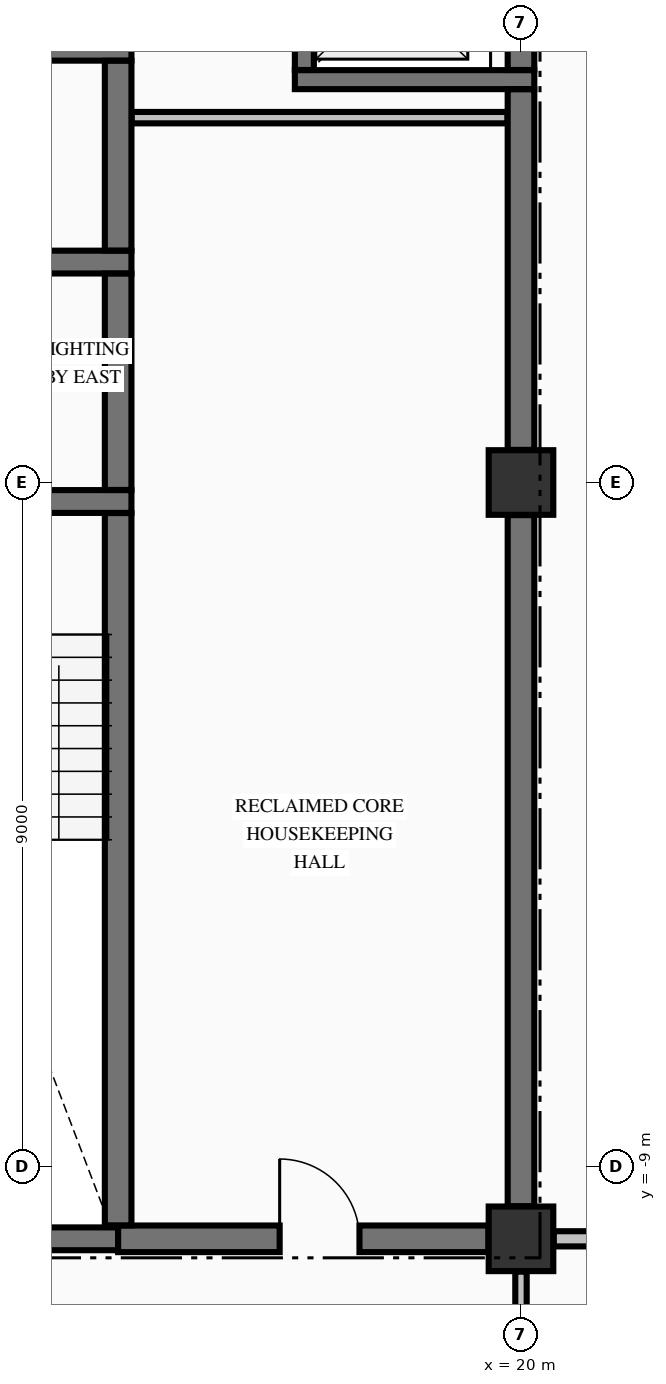
"""IFC4 building model, lengths in metres.
Left out: names, types, materials, properties, quantities, classifications, styles, units other than length and angle.
Written with IfcOpenShell. Run it as: python <this file> out.ifc"""

import sys

from ifc_helpers import new_model, si_unit, direction, frame, frame_2d, origin, origin_2d, place, context, subcontext, project, spatial, rectangle, extrude, element, fill, save


model = new_model("IFC4")
c1 = context("Model", 3, precision=1e-05, world=origin(), true_north=direction((0.0, 1.0)))
c2 = subcontext(c1, "Body", "Model", "MODEL_VIEW")
j1 = project(units=[si_unit("LENGTHUNIT", "METRE"), si_unit("PLANEANGLEUNIT", "RADIAN")], contexts=[c1])
p1 = place(None, origin())
s1 = spatial("IfcSite", under=j1, at=p1, CompositionType="ELEMENT")
p2 = place(p1, origin())
s2 = spatial("IfcBuilding", under=s1, at=p2, CompositionType="ELEMENT")
p3 = place(p2, frame((0.0, 0.0, 166.06)))
s3 = spatial("IfcBuildingStorey", under=s2, at=p3, CompositionType="ELEMENT", Elevation=166.06)
for number, where, z_axis, x_axis in (
    (1, (20.0, -9.95, -0.25), (0.0, 0.0, 1.0), (1.0, 0.0, 0.0)),
    (2, (20.0, 0.0, -0.25), (0.0, 0.0, 1.0), (1.0, 0.0, 0.0)),
):
    element("IfcColumn", number, at=place(p3, frame(where, z_axis=z_axis, x_axis=x_axis)), inside=s3, PredefinedType="COLUMN", context=c2, shape_type="SweptSolid", body=[
        extrude(rectangle(XDim=0.85, YDim=0.85, at=origin_2d()), origin(), (0.0, 0.0, 1.0), 3.4),
    ])
p4 = place(p3, frame((11.429, -9.95, 0.0), z_axis=(0.0, 0.0, 1.0), x_axis=(1.0, 0.0, 0.0)))
e3 = element("IfcWall", 3, at=p4, inside=s3, PredefinedType="SHEAR", context=c2, shape_type="SweptSolid", body=[
    extrude(rectangle(XDim=3.271, YDim=0.3, at=frame_2d((1.635, 0.0))), origin(), (0.0, 0.0, 1.0), 3.15),
])
p5 = place(p3, frame((14.7, -9.95, 0.0), z_axis=(0.0, 0.0, 1.0), x_axis=(1.0, 0.0, 0.0)))
e4 = element("IfcWall", 4, at=p5, inside=s3, PredefinedType="SHEAR", context=c2, shape_type="SweptSolid", body=[
    extrude(rectangle(XDim=4.871, YDim=0.35, at=frame_2d((2.436, 0.0))), origin(), (0.0, 0.0, 1.0), 3.15),
])
p6 = place(p5, frame((2.125, 0.0, 0.0)))
e5 = element("IfcOpeningElement", 5, at=p6, cuts=e4, PredefinedType="OPENING", context=c2, shape_type="SweptSolid", body=[
    extrude(rectangle(XDim=1.05, YDim=2.15, at=frame_2d((0.525, 1.075))), frame((0.0, 0.185, 0.0), z_axis=(0.0, -1.0, 0.0), x_axis=(1.0, 0.0, 0.0)), (0.0, 0.0, 1.0), 0.37),
])
p7 = place(p3, frame((11.429, -0.25, 0.0), z_axis=(0.0, 0.0, 1.0), x_axis=(1.0, 0.0, 0.0)))
e6 = element("IfcWall", 6, at=p7, inside=s3, PredefinedType="SHEAR", context=c2, shape_type="SweptSolid", body=[
    extrude(rectangle(XDim=3.446, YDim=0.3, at=frame_2d((1.723, 0.0))), origin(), (0.0, 0.0, 1.0), 3.15),
])
p8 = place(p7, frame((1.171, 0.0, 0.0)))
e7 = element("IfcOpeningElement", 7, at=p8, cuts=e6, PredefinedType="OPENING", context=c2, shape_type="SweptSolid", body=[
    extrude(rectangle(XDim=1.1, YDim=2.15, at=frame_2d((0.55, 1.075))), frame((0.0, 0.16, 0.0), z_axis=(0.0, -1.0, 0.0), x_axis=(1.0, 0.0, 0.0)), (0.0, 0.0, 1.0), 0.32),
])
p9 = place(p3, frame((10.85, 2.9, 0.0), z_axis=(0.0, 0.0, 1.0), x_axis=(1.0, 0.0, 0.0)))
e8 = element("IfcWall", 8, at=p9, inside=s3, PredefinedType="SHEAR", context=c2, shape_type="SweptSolid", body=[
    extrude(rectangle(XDim=4.025, YDim=0.3, at=frame_2d((2.012, 0.0))), origin(), (0.0, 0.0, 1.0), 3.15),
])
p10 = place(p9, frame((0.85, 0.0, 0.0)))
e9 = element("IfcOpeningElement", 9, at=p10, cuts=e8, PredefinedType="OPENING", context=c2, shape_type="SweptSolid", body=[
    extrude(rectangle(XDim=1.1, YDim=2.2, at=frame_2d((0.55, 1.1))), frame((0.0, 0.16, 0.0), z_axis=(0.0, -1.0, 0.0), x_axis=(1.0, 0.0, 0.0)), (0.0, 0.0, 1.0), 0.32),
])
p11 = place(p3, frame((17.025, 5.3, 0.0), z_axis=(0.0, 0.0, 1.0), x_axis=(1.0, 0.0, 0.0)))
e10 = element("IfcWall", 10, at=p11, inside=s3, PredefinedType="SOLIDWALL", context=c2, shape_type="SweptSolid", body=[
    extrude(rectangle(XDim=3.15, YDim=0.25, at=frame_2d((1.575, 0.0))), origin(), (0.0, 0.0, 1.0), 3.15),
])
p12 = place(p3, frame((10.85, 5.7, 0.0), z_axis=(0.0, 0.0, 1.0), x_axis=(1.0, 0.0, 0.0)))
e11 = element("IfcWall", 11, at=p12, inside=s3, PredefinedType="SHEAR", context=c2, shape_type="SweptSolid", body=[
    extrude(rectangle(XDim=4.025, YDim=0.3, at=frame_2d((2.012, 0.0))), origin(), (0.0, 0.0, 1.0), 3.15),
])
p13 = place(p3, frame((20.431, -9.95, 0.0), z_axis=(0.0, 0.0, 1.0), x_axis=(1.0, 0.0, 0.0)))
e12 = element("IfcWall", 12, at=p13, inside=s3, PredefinedType="PARTITIONING", context=c2, shape_type="SweptSolid", body=[
    extrude(rectangle(XDim=6.404, YDim=0.2, at=frame_2d((3.202, 0.0))), origin(), (0.0, 0.0, 1.0), 3.15),
])
p14 = place(p3, frame((14.878, 4.8, 0.0), z_axis=(0.0, 0.0, 1.0), x_axis=(1.0, 0.0, 0.0)))
e13 = element("IfcWall", 13, at=p14, inside=s3, PredefinedType="PARTITIONING", context=c2, shape_type="SweptSolid", body=[
    extrude(rectangle(XDim=4.944, YDim=0.15, at=frame_2d((2.472, 0.0))), origin(), (0.0, 0.0, 1.0), 3.15),
])
p15 = place(p3, frame((14.7, -9.773, 0.0), z_axis=(0.0, 0.0, 1.0), x_axis=(0.0, 1.0, 0.0)))
e14 = element("IfcWall", 14, at=p15, inside=s3, PredefinedType="SHEAR", context=c2, shape_type="SweptSolid", body=[
    extrude(rectangle(XDim=9.371, YDim=0.35, at=frame_2d((4.686, 0.0))), origin(), (0.0, 0.0, 1.0), 3.15),
])
p16 = place(p3, frame((14.7, -0.098, 0.0), z_axis=(0.0, 0.0, 1.0), x_axis=(0.0, 1.0, 0.0)))
e15 = element("IfcWall", 15, at=p16, inside=s3, PredefinedType="SHEAR", context=c2, shape_type="SweptSolid", body=[
    extrude(rectangle(XDim=2.846, YDim=0.35, at=frame_2d((1.423, 0.0))), origin(), (0.0, 0.0, 1.0), 3.15),
])
p17 = place(p3, frame((14.7, 3.052, 0.0), z_axis=(0.0, 0.0, 1.0), x_axis=(0.0, 1.0, 0.0)))
e16 = element("IfcWall", 16, at=p17, inside=s3, PredefinedType="SHEAR", context=c2, shape_type="SweptSolid", body=[
    extrude(rectangle(XDim=2.496, YDim=0.35, at=frame_2d((1.248, 0.0))), origin(), (0.0, 0.0, 1.0), 3.15),
])
p18 = place(p3, frame((17.15, 5.427, 0.0), z_axis=(0.0, 0.0, 1.0), x_axis=(0.0, 1.0, 0.0)))
e17 = element("IfcWall", 17, at=p18, inside=s3, PredefinedType="SOLIDWALL", context=c2, shape_type="SweptSolid", body=[
    extrude(rectangle(XDim=2.196, YDim=0.25, at=frame_2d((1.098, 0.0))), origin(), (0.0, 0.0, 1.0), 3.15),
])
p19 = place(p18, frame((0.548, 0.0, 0.0)))
e18 = element("IfcOpeningElement", 18, at=p19, cuts=e17, PredefinedType="OPENING", context=c2, shape_type="SweptSolid", body=[
    extrude(rectangle(XDim=1.1, YDim=2.2, at=frame_2d((0.55, 1.1))), frame((0.0, 0.135, 0.0), z_axis=(0.0, -1.0, 0.0), x_axis=(1.0, 0.0, 0.0)), (0.0, 0.0, 1.0), 0.27),
])
p20 = place(p3, frame((20.0, -9.521, 0.0), z_axis=(0.0, 0.0, 1.0), x_axis=(0.0, 1.0, 0.0)))
e19 = element("IfcWall", 19, at=p20, inside=s3, PredefinedType="SHEAR", context=c2, shape_type="SweptSolid", body=[
    extrude(rectangle(XDim=9.092, YDim=0.35, at=frame_2d((4.546, 0.0))), origin(), (0.0, 0.0, 1.0), 3.15),
])
p21 = place(p3, frame((20.0, 0.429, 0.0), z_axis=(0.0, 0.0, 1.0), x_axis=(0.0, 1.0, 0.0)))
e20 = element("IfcWall", 20, at=p21, inside=s3, PredefinedType="SHEAR", context=c2, shape_type="SweptSolid", body=[
    extrude(rectangle(XDim=4.744, YDim=0.35, at=frame_2d((2.372, 0.0))), origin(), (0.0, 0.0, 1.0), 3.15),
])
p22 = place(p3, frame((20.0, 5.427, 0.0), z_axis=(0.0, 0.0, 1.0), x_axis=(0.0, 1.0, 0.0)))
e21 = element("IfcWall", 21, at=p22, inside=s3, PredefinedType="SHEAR", context=c2, shape_type="SweptSolid", body=[
    extrude(rectangle(XDim=2.196, YDim=0.35, at=frame_2d((1.098, 0.0))), origin(), (0.0, 0.0, 1.0), 3.15),
])
p23 = place(p3, frame((20.0, -12.197, 0.0), z_axis=(0.0, 0.0, 1.0), x_axis=(0.0, 1.0, 0.0)))
e22 = element("IfcWall", 22, at=p23, inside=s3, PredefinedType="PARTITIONING", context=c2, shape_type="SweptSolid", body=[
    extrude(rectangle(XDim=1.816, YDim=0.15, at=frame_2d((0.908, 0.0))), origin(), (0.0, 0.0, 1.0), 2.342),
])
p24 = place(p6, origin())
e23 = element("IfcDoor", 23, at=p24, inside=s3, OperationType="SINGLE_SWING_LEFT", PredefinedType="DOOR", context=c2, shape_type="SweptSolid", body=[
    extrude(rectangle(XDim=1.05, YDim=2.15, at=frame_2d((0.525, 1.075))), frame((0.0, 0.025, 0.0), z_axis=(0.0, -1.0, 0.0), x_axis=(1.0, 0.0, 0.0)), (0.0, 0.0, 1.0), 0.05),
])
fill(e5, e23)
save(model, sys.argv[1])
